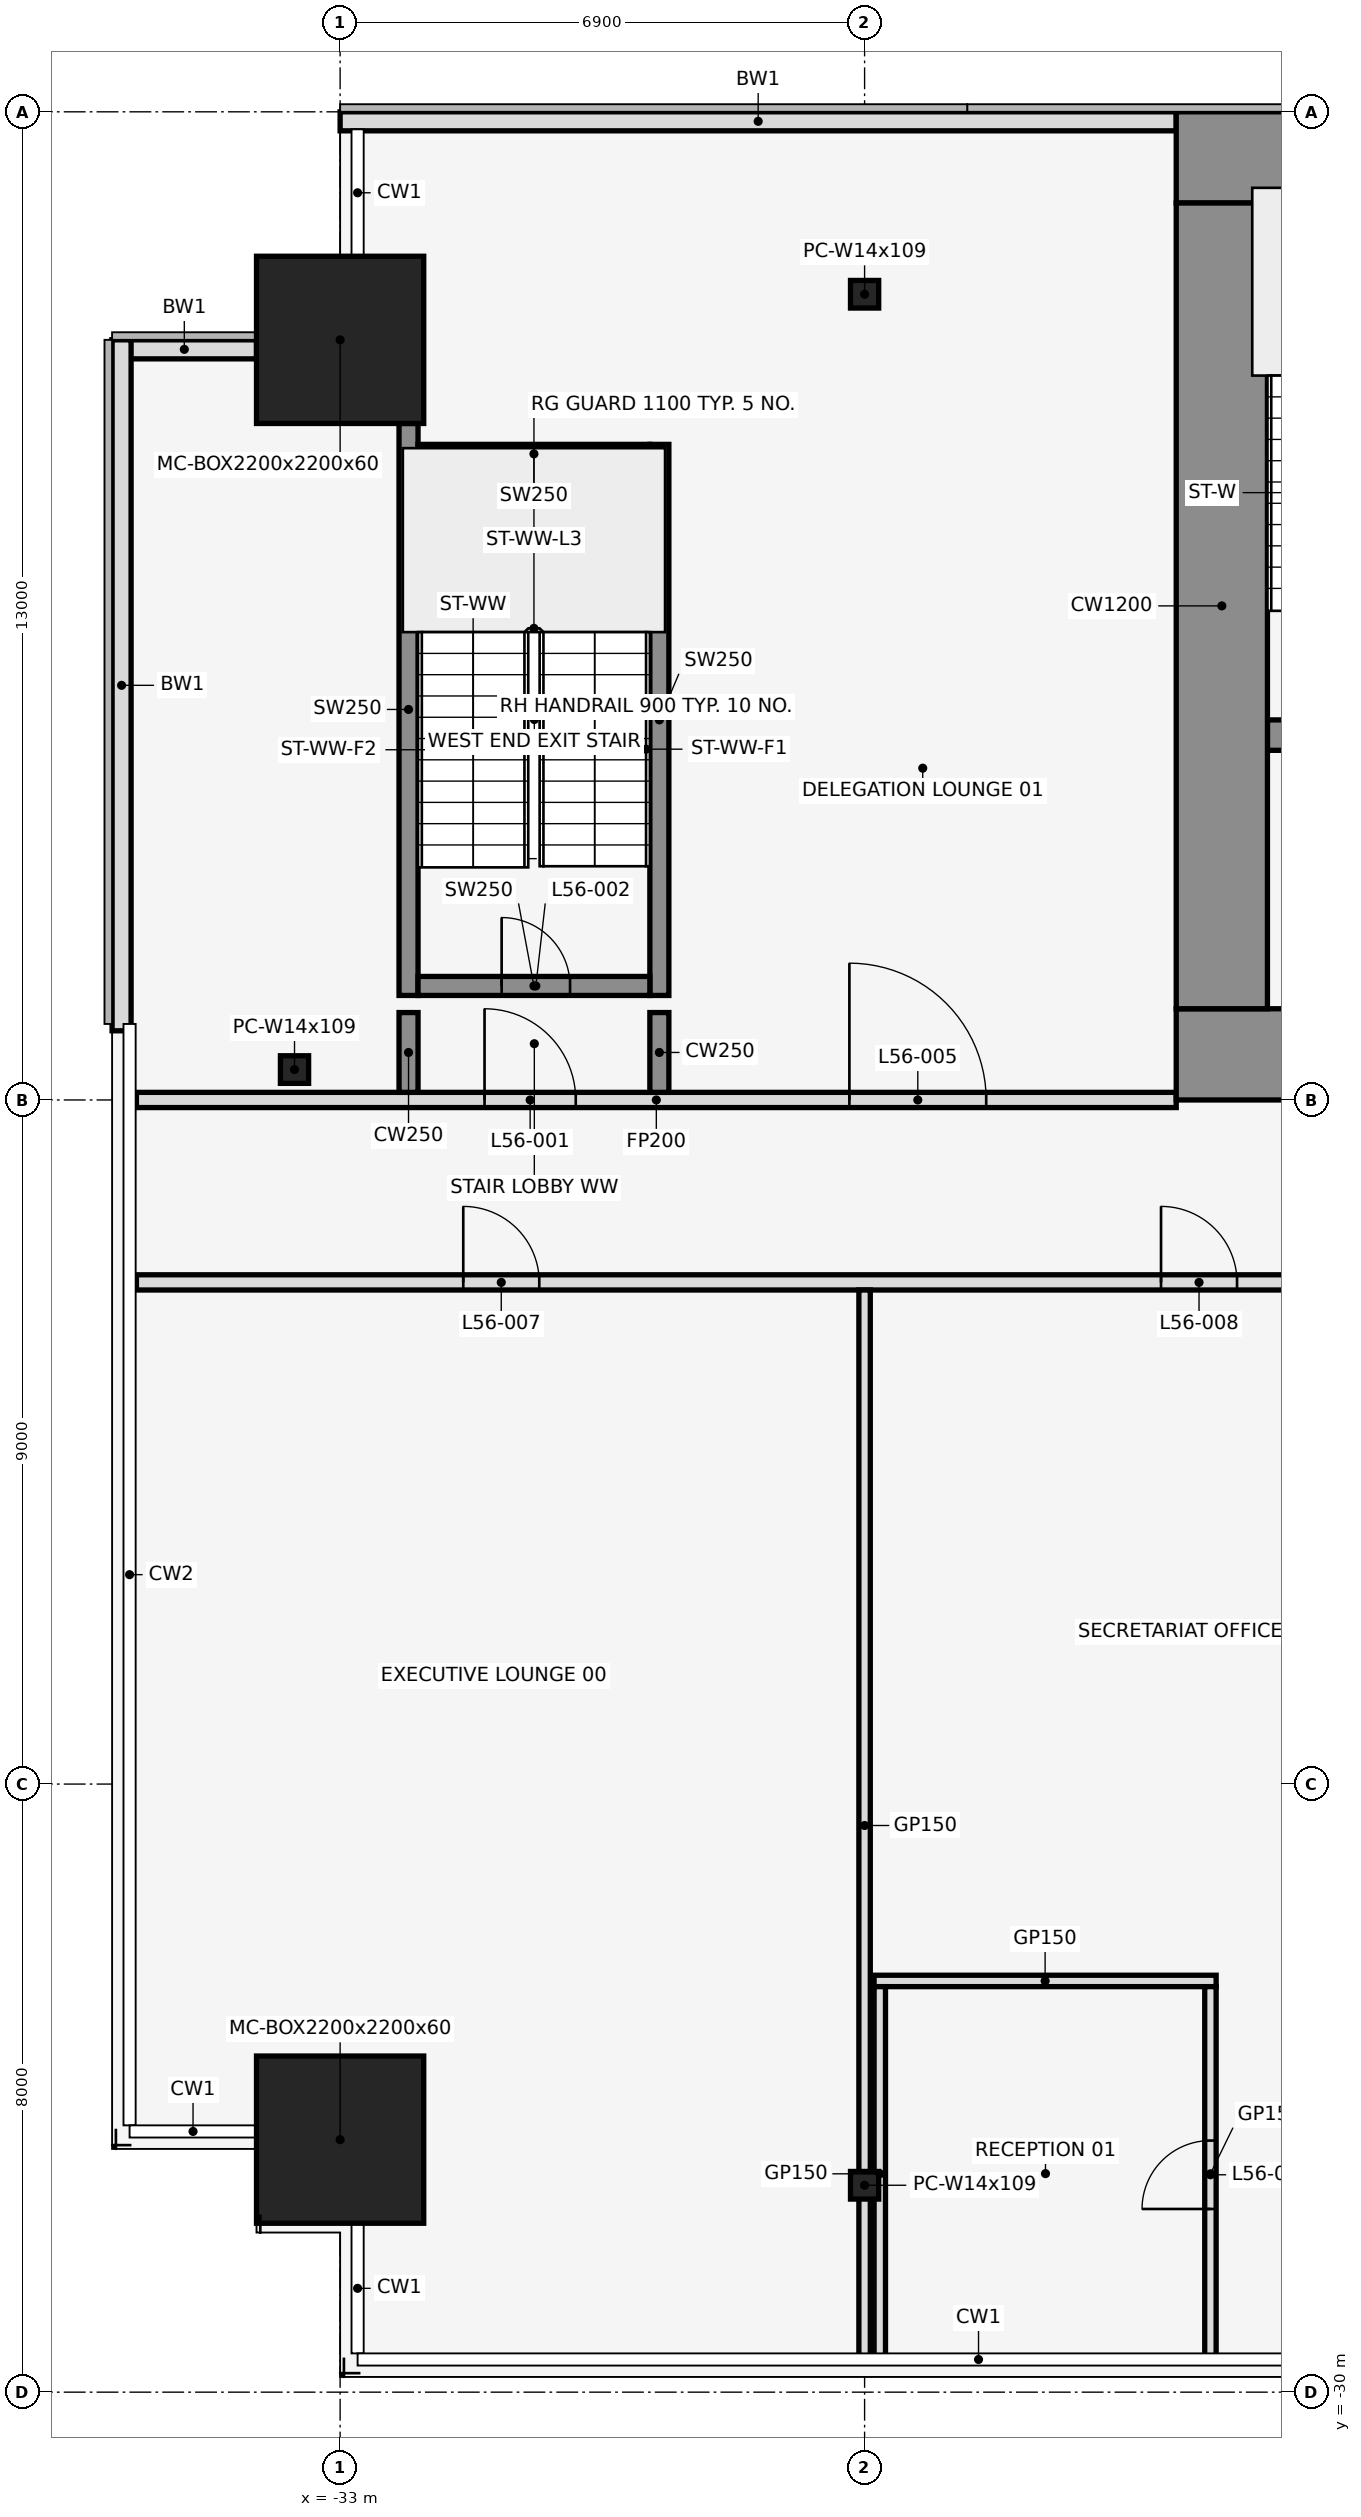
"""IFC4 building model, lengths in metres.
Left out: names, types, materials, properties, quantities, classifications, styles, units other than length and angle.
Written with IfcOpenShell. Run it as: python <this file> out.ifc"""

import sys

from ifc_helpers import new_model, si_unit, direction, frame, frame_2d, origin, origin_2d, place, context, subcontext, project, spatial, rectangle, hollow_rectangle, i_section, extrude, element, fill, save


model = new_model("IFC4")
c1 = context("Model", 3, precision=1e-05, world=origin(), true_north=direction((0.0, 1.0)))
c2 = subcontext(c1, "Body", "Model", "MODEL_VIEW")
j1 = project(units=[si_unit("LENGTHUNIT", "METRE"), si_unit("PLANEANGLEUNIT", "RADIAN")], contexts=[c1])
p1 = place(None, origin())
s1 = spatial("IfcSite", under=j1, at=p1, CompositionType="ELEMENT")
p2 = place(p1, origin())
s2 = spatial("IfcBuilding", under=s1, at=p2, CompositionType="ELEMENT")
p3 = place(p2, frame((0.0, 0.0, 249.8)))
s3 = spatial("IfcBuildingStorey", under=s2, at=p3, CompositionType="ELEMENT", Elevation=249.8)
for number, where, z_axis, x_axis in (
    (1, (-33.0, -26.678, 0.0), (0.0, 0.0, 1.0), (1.0, 0.0, 0.0)),
    (2, (-33.0, -3.0, 0.0), (0.0, 0.0, 1.0), (1.0, 0.0, 0.0)),
):
    element("IfcColumn", number, at=place(p3, frame(where, z_axis=z_axis, x_axis=x_axis)), inside=s3, PredefinedType="COLUMN", context=c2, shape_type="SweptSolid", body=[
        extrude(hollow_rectangle(XDim=2.2, YDim=2.2, WallThickness=0.06, at=origin_2d()), origin(), (0.0, 0.0, 1.0), 4.2),
    ])
for number, where, z_axis, x_axis in (
    (3, (-26.1, -27.278, 0.0), (0.0, 0.0, 1.0), (1.0, 0.0, 0.0)),
    (4, (-26.1, -2.4, 0.0), (0.0, 0.0, 1.0), (1.0, 0.0, 0.0)),
    (5, (-33.6, -12.6, 0.0), (0.0, 0.0, 1.0), (1.0, 0.0, 0.0)),
):
    element("IfcColumn", number, at=place(p3, frame(where, z_axis=z_axis, x_axis=x_axis)), inside=s3, PredefinedType="COLUMN", context=c2, shape_type="SweptSolid", body=[
        extrude(i_section(OverallWidth=0.371, OverallDepth=0.363, WebThickness=0.013, FlangeThickness=0.022, at=origin_2d()), origin(), (0.0, 0.0, 1.0), 4.2),
    ])
p4 = place(p3, frame((-22.0, -0.125, 0.0), z_axis=(0.0, 0.0, 1.0), x_axis=(-1.0, 0.0, 0.0)))
e6 = element("IfcWall", 6, at=p4, inside=s3, PredefinedType="STANDARD", context=c2, shape_type="SweptSolid", body=[
    extrude(rectangle(XDim=11.0, YDim=0.25, at=frame_2d((5.5, 0.0))), origin(), (0.0, 0.0, 1.0), 4.05),
])
p5 = place(p3, frame((-34.1, -3.125, 0.0), z_axis=(0.0, 0.0, 1.0), x_axis=(-1.0, 0.0, 0.0)))
e7 = element("IfcWall", 7, at=p5, inside=s3, PredefinedType="STANDARD", context=c2, shape_type="SweptSolid", body=[
    extrude(rectangle(XDim=1.9, YDim=0.25, at=frame_2d((0.95, 0.0))), origin(), (0.0, 0.0, 1.0), 4.05),
])
p6 = place(p3, frame((-35.875, -3.0, 0.0), z_axis=(0.0, 0.0, 1.0), x_axis=(0.0, -1.0, 0.0)))
e8 = element("IfcWall", 8, at=p6, inside=s3, PredefinedType="STANDARD", context=c2, shape_type="SweptSolid", body=[
    extrude(rectangle(XDim=9.09, YDim=0.25, at=frame_2d((4.545, 0.0))), origin(), (0.0, 0.0, 1.0), 4.05),
])
p7 = place(p3, frame((-32.1, -11.625, 0.0), z_axis=(0.0, 0.0, 1.0), x_axis=(0.0, 1.0, 0.0)))
e9 = element("IfcWall", 9, at=p7, inside=s3, PredefinedType="SHEAR", context=c2, shape_type="SweptSolid", body=[
    extrude(rectangle(XDim=7.525, YDim=0.25, at=frame_2d((3.762, 0.0))), origin(), (0.0, 0.0, 1.0), 4.2),
])
p8 = place(p3, frame((-28.8, -11.625, 0.0), z_axis=(0.0, 0.0, 1.0), x_axis=(0.0, 1.0, 0.0)))
e10 = element("IfcWall", 10, at=p8, inside=s3, PredefinedType="SHEAR", context=c2, shape_type="SweptSolid", body=[
    extrude(rectangle(XDim=7.25, YDim=0.25, at=frame_2d((3.625, 0.0))), origin(), (0.0, 0.0, 1.0), 4.2),
])
p9 = place(p3, frame((-31.975, -11.5, 0.0), z_axis=(0.0, 0.0, 1.0), x_axis=(1.0, 0.0, 0.0)))
e11 = element("IfcWall", 11, at=p9, inside=s3, PredefinedType="SHEAR", context=c2, shape_type="SweptSolid", body=[
    extrude(rectangle(XDim=3.05, YDim=0.25, at=frame_2d((1.525, 0.0))), origin(), (0.0, 0.0, 1.0), 4.2),
])
p10 = place(p9, frame((1.1, 0.0, 0.0)))
e12 = element("IfcOpeningElement", 12, at=p10, cuts=e11, PredefinedType="OPENING", context=c2, shape_type="SweptSolid", body=[
    extrude(rectangle(XDim=0.9, YDim=2.1, at=frame_2d((0.45, 1.05))), frame((0.0, 0.137, 0.0), z_axis=(0.0, -1.0, 0.0), x_axis=(1.0, 0.0, 0.0)), (0.0, 0.0, 1.0), 0.274),
])
p11 = place(p3, frame((-31.975, -4.5, 0.0), z_axis=(0.0, 0.0, 1.0), x_axis=(1.0, 0.0, 0.0)))
e13 = element("IfcWall", 13, at=p11, inside=s3, PredefinedType="SHEAR", context=c2, shape_type="SweptSolid", body=[
    extrude(rectangle(XDim=3.05, YDim=0.25, at=frame_2d((1.525, 0.0))), origin(), (0.0, 0.0, 1.0), 4.2),
])
p12 = place(p3, frame((-25.975, -24.59, 0.0), z_axis=(0.0, 0.0, 1.0), x_axis=(1.0, 0.0, 0.0)))
e14 = element("IfcWall", 14, at=p12, inside=s3, PredefinedType="PARTITIONING", context=c2, shape_type="SweptSolid", body=[
    extrude(rectangle(XDim=4.5, YDim=0.15, at=frame_2d((2.25, 0.0))), origin(), (0.0, 0.0, 1.0), 3.039),
])
p13 = place(p3, frame((-35.68, -15.4, 0.0), z_axis=(0.0, 0.0, 1.0), x_axis=(1.0, 0.0, 0.0)))
e15 = element("IfcWall", 15, at=p13, inside=s3, PredefinedType="PARTITIONING", context=c2, shape_type="SweptSolid", body=[
    extrude(rectangle(XDim=34.28, YDim=0.2, at=frame_2d((17.14, 0.0))), origin(), (0.0, 0.0, 1.0), 3.039),
])
p14 = place(p13, frame((4.3, 0.0, 0.0)))
e16 = element("IfcOpeningElement", 16, at=p14, cuts=e15, PredefinedType="OPENING", context=c2, shape_type="SweptSolid", body=[
    extrude(rectangle(XDim=1.0, YDim=2.1, at=frame_2d((0.5, 1.05))), frame((0.0, 0.112, 0.0), z_axis=(0.0, -1.0, 0.0), x_axis=(1.0, 0.0, 0.0)), (0.0, 0.0, 1.0), 0.224),
])
p15 = place(p13, frame((13.48, 0.0, 0.0)))
e17 = element("IfcOpeningElement", 17, at=p15, cuts=e15, PredefinedType="OPENING", context=c2, shape_type="SweptSolid", body=[
    extrude(rectangle(XDim=1.0, YDim=2.1, at=frame_2d((0.5, 1.05))), frame((0.0, 0.112, 0.0), z_axis=(0.0, -1.0, 0.0), x_axis=(1.0, 0.0, 0.0)), (0.0, 0.0, 1.0), 0.224),
])
p16 = place(p13, frame((20.68, 0.0, 0.0)))
e18 = element("IfcOpeningElement", 18, at=p16, cuts=e15, PredefinedType="OPENING", context=c2, shape_type="SweptSolid", body=[
    extrude(rectangle(XDim=1.0, YDim=2.1, at=frame_2d((0.5, 1.05))), frame((0.0, 0.112, 0.0), z_axis=(0.0, -1.0, 0.0), x_axis=(1.0, 0.0, 0.0)), (0.0, 0.0, 1.0), 0.224),
])
p17 = place(p13, frame((26.48, 0.0, 0.0)))
e19 = element("IfcOpeningElement", 19, at=p17, cuts=e15, PredefinedType="OPENING", context=c2, shape_type="SweptSolid", body=[
    extrude(rectangle(XDim=1.0, YDim=2.1, at=frame_2d((0.5, 1.05))), frame((0.0, 0.112, 0.0), z_axis=(0.0, -1.0, 0.0), x_axis=(1.0, 0.0, 0.0)), (0.0, 0.0, 1.0), 0.224),
])
p18 = place(p3, frame((-35.68, -13.0, 0.0), z_axis=(0.0, 0.0, 1.0), x_axis=(1.0, 0.0, 0.0)))
e20 = element("IfcWall", 20, at=p18, inside=s3, PredefinedType="PARTITIONING", context=c2, shape_type="SweptSolid", body=[
    extrude(rectangle(XDim=13.68, YDim=0.2, at=frame_2d((6.84, 0.0))), origin(), (0.0, 0.0, 1.0), 3.039),
])
p19 = place(p18, frame((4.58, 0.0, 0.0)))
e21 = element("IfcOpeningElement", 21, at=p19, cuts=e20, PredefinedType="OPENING", context=c2, shape_type="SweptSolid", body=[
    extrude(rectangle(XDim=1.2, YDim=2.1, at=frame_2d((0.6, 1.05))), frame((0.0, 0.112, 0.0), z_axis=(0.0, -1.0, 0.0), x_axis=(1.0, 0.0, 0.0)), (0.0, 0.0, 1.0), 0.224),
])
p20 = place(p18, frame((9.38, 0.0, 0.0)))
e22 = element("IfcOpeningElement", 22, at=p20, cuts=e20, PredefinedType="OPENING", context=c2, shape_type="SweptSolid", body=[
    extrude(rectangle(XDim=1.8, YDim=2.1, at=frame_2d((0.9, 1.05))), frame((0.0, 0.112, 0.0), z_axis=(0.0, -1.0, 0.0), x_axis=(1.0, 0.0, 0.0)), (0.0, 0.0, 1.0), 0.224),
])
for number, where, z_axis, x_axis in (
    (23, (-32.1, -12.9, 0.0), (0.0, 0.0, 1.0), (0.0, 1.0, 0.0)),
    (24, (-28.8, -12.9, 0.0), (0.0, 0.0, 1.0), (0.0, 1.0, 0.0)),
):
    element("IfcWall", number, at=place(p3, frame(where, z_axis=z_axis, x_axis=x_axis)), inside=s3, PredefinedType="SHEAR", context=c2, shape_type="SweptSolid", body=[
        extrude(rectangle(XDim=1.05, YDim=0.25, at=frame_2d((0.525, 0.0))), origin(), (0.0, 0.0, 1.0), 4.2),
    ])
p21 = place(p3, frame((-26.1, -29.59, 0.0), z_axis=(0.0, 0.0, 1.0), x_axis=(0.0, 1.0, 0.0)))
e25 = element("IfcWall", 25, at=p21, inside=s3, PredefinedType="PARTITIONING", context=c2, shape_type="SweptSolid", body=[
    extrude(rectangle(XDim=14.09, YDim=0.15, at=frame_2d((7.045, 0.0))), origin(), (0.0, 0.0, 1.0), 3.039),
])
p22 = place(p3, frame((-25.9, -29.59, 0.0), z_axis=(0.0, 0.0, 1.0), x_axis=(0.0, 1.0, 0.0)))
e26 = element("IfcWall", 26, at=p22, inside=s3, PredefinedType="PARTITIONING", context=c2, shape_type="SweptSolid", body=[
    extrude(rectangle(XDim=4.925, YDim=0.15, at=frame_2d((2.462, 0.0))), origin(), (0.0, 0.0, 1.0), 3.039),
])
p23 = place(p3, frame((-21.55, -29.59, 0.0), z_axis=(0.0, 0.0, 1.0), x_axis=(0.0, 1.0, 0.0)))
e27 = element("IfcWall", 27, at=p23, inside=s3, PredefinedType="PARTITIONING", context=c2, shape_type="SweptSolid", body=[
    extrude(rectangle(XDim=4.925, YDim=0.15, at=frame_2d((2.462, 0.0))), origin(), (0.0, 0.0, 1.0), 3.039),
])
p24 = place(p23, frame((2.0, 0.0, 0.0)))
e28 = element("IfcOpeningElement", 28, at=p24, cuts=e27, PredefinedType="OPENING", context=c2, shape_type="SweptSolid", body=[
    extrude(rectangle(XDim=0.9, YDim=2.1, at=frame_2d((0.45, 1.05))), frame((0.0, 0.087, 0.0), z_axis=(0.0, -1.0, 0.0), x_axis=(1.0, 0.0, 0.0)), (0.0, 0.0, 1.0), 0.174),
])
p25 = place(p3, frame((-20.8, -8.2, 0.0), z_axis=(0.0, 0.0, 1.0), x_axis=(1.0, 0.0, 0.0)))
e29 = element("IfcWall", 29, at=p25, inside=s3, PredefinedType="SHEAR", context=c2, shape_type="SweptSolid", body=[
    extrude(rectangle(XDim=3.0, YDim=0.4, at=frame_2d((1.5, 0.0))), origin(), (0.0, 0.0, 1.0), 4.2),
])
p26 = place(p25, frame((0.85, 0.0, 0.0)))
e30 = element("IfcOpeningElement", 30, at=p26, cuts=e29, PredefinedType="OPENING", context=c2, shape_type="SweptSolid", body=[
    extrude(rectangle(XDim=1.2, YDim=2.1, at=frame_2d((0.6, 1.05))), frame((0.0, 0.212, 0.0), z_axis=(0.0, -1.0, 0.0), x_axis=(1.0, 0.0, 0.0)), (0.0, 0.0, 1.0), 0.424),
])
p27 = place(p3, frame((-22.0, -0.6, 0.0), z_axis=(0.0, 0.0, 1.0), x_axis=(1.0, 0.0, 0.0)))
e31 = element("IfcWall", 31, at=p27, inside=s3, PredefinedType="SHEAR", context=c2, shape_type="SweptSolid", body=[
    extrude(rectangle(XDim=44.0, YDim=1.2, at=frame_2d((22.0, 0.0))), origin(), (0.0, 0.0, 1.0), 4.2),
])
p28 = place(p27, frame((18.55, 0.0, 0.0)))
e32 = element("IfcOpeningElement", 32, at=p28, cuts=e31, PredefinedType="OPENING", context=c2, shape_type="SweptSolid", body=[
    extrude(rectangle(XDim=0.9, YDim=2.1, at=frame_2d((0.45, 1.05))), frame((0.0, 0.612, 0.0), z_axis=(0.0, -1.0, 0.0), x_axis=(1.0, 0.0, 0.0)), (0.0, 0.0, 1.0), 1.224),
])
p29 = place(p27, frame((24.55, 0.0, 0.0)))
e33 = element("IfcOpeningElement", 33, at=p29, cuts=e31, PredefinedType="OPENING", context=c2, shape_type="SweptSolid", body=[
    extrude(rectangle(XDim=0.9, YDim=2.1, at=frame_2d((0.45, 1.05))), frame((0.0, 0.612, 0.0), z_axis=(0.0, -1.0, 0.0), x_axis=(1.0, 0.0, 0.0)), (0.0, 0.0, 1.0), 1.224),
])
p30 = place(p3, frame((-22.0, -12.4, 0.0), z_axis=(0.0, 0.0, 1.0), x_axis=(1.0, 0.0, 0.0)))
e34 = element("IfcWall", 34, at=p30, inside=s3, PredefinedType="SHEAR", context=c2, shape_type="SweptSolid", body=[
    extrude(rectangle(XDim=44.0, YDim=1.2, at=frame_2d((22.0, 0.0))), origin(), (0.0, 0.0, 1.0), 4.2),
])
p31 = place(p30, frame((2.2, 0.0, 0.0)))
e35 = element("IfcOpeningElement", 35, at=p31, cuts=e34, PredefinedType="OPENING", context=c2, shape_type="SweptSolid", body=[
    extrude(rectangle(XDim=1.2, YDim=2.1, at=frame_2d((0.6, 1.05))), frame((0.0, 0.612, 0.0), z_axis=(0.0, -1.0, 0.0), x_axis=(1.0, 0.0, 0.0)), (0.0, 0.0, 1.0), 1.224),
])
p32 = place(p30, frame((21.4, 0.0, 0.0)))
e36 = element("IfcOpeningElement", 36, at=p32, cuts=e34, PredefinedType="OPENING", context=c2, shape_type="SweptSolid", body=[
    extrude(rectangle(XDim=1.2, YDim=2.1, at=frame_2d((0.6, 1.05))), frame((0.0, 0.612, 0.0), z_axis=(0.0, -1.0, 0.0), x_axis=(1.0, 0.0, 0.0)), (0.0, 0.0, 1.0), 1.224),
])
p33 = place(p30, frame((40.6, 0.0, 0.0)))
e37 = element("IfcOpeningElement", 37, at=p33, cuts=e34, PredefinedType="OPENING", context=c2, shape_type="SweptSolid", body=[
    extrude(rectangle(XDim=1.2, YDim=2.1, at=frame_2d((0.6, 1.05))), frame((0.0, 0.612, 0.0), z_axis=(0.0, -1.0, 0.0), x_axis=(1.0, 0.0, 0.0)), (0.0, 0.0, 1.0), 1.224),
])
p34 = place(p30, frame((16.0, 0.0, 0.0)))
e38 = element("IfcOpeningElement", 38, at=p34, cuts=e34, PredefinedType="OPENING", context=c2, shape_type="SweptSolid", body=[
    extrude(rectangle(XDim=1.8, YDim=2.1, at=frame_2d((0.9, 1.05))), frame((0.0, 0.612, 0.0), z_axis=(0.0, -1.0, 0.0), x_axis=(1.0, 0.0, 0.0)), (0.0, 0.0, 1.0), 1.224),
])
p35 = place(p30, frame((6.3, 0.0, 0.0)))
e39 = element("IfcOpeningElement", 39, at=p35, cuts=e34, PredefinedType="OPENING", context=c2, shape_type="SweptSolid", body=[
    extrude(rectangle(XDim=1.2, YDim=2.1, at=frame_2d((0.6, 1.05))), frame((0.0, 0.612, 0.0), z_axis=(0.0, -1.0, 0.0), x_axis=(1.0, 0.0, 0.0)), (0.0, 0.0, 1.0), 1.224),
])
p36 = place(p30, frame((26.2, 0.0, 0.0)))
e40 = element("IfcOpeningElement", 40, at=p36, cuts=e34, PredefinedType="OPENING", context=c2, shape_type="SweptSolid", body=[
    extrude(rectangle(XDim=1.8, YDim=2.1, at=frame_2d((0.9, 1.05))), frame((0.0, 0.612, 0.0), z_axis=(0.0, -1.0, 0.0), x_axis=(1.0, 0.0, 0.0)), (0.0, 0.0, 1.0), 1.224),
])
p37 = place(p30, frame((36.5, 0.0, 0.0)))
e41 = element("IfcOpeningElement", 41, at=p37, cuts=e34, PredefinedType="OPENING", context=c2, shape_type="SweptSolid", body=[
    extrude(rectangle(XDim=1.2, YDim=2.1, at=frame_2d((0.6, 1.05))), frame((0.0, 0.612, 0.0), z_axis=(0.0, -1.0, 0.0), x_axis=(1.0, 0.0, 0.0)), (0.0, 0.0, 1.0), 1.224),
])
p38 = place(p3, frame((-21.4, -11.8, 0.0), z_axis=(0.0, 0.0, 1.0), x_axis=(0.0, 1.0, 0.0)))
e42 = element("IfcWall", 42, at=p38, inside=s3, PredefinedType="SHEAR", context=c2, shape_type="SweptSolid", body=[
    extrude(rectangle(XDim=10.6, YDim=1.2, at=frame_2d((5.3, 0.0))), origin(), (0.0, 0.0, 1.0), 4.2),
])
p39 = place(p19, origin())
e43 = element("IfcDoor", 43, at=p39, inside=s3, OperationType="SINGLE_SWING_LEFT", PredefinedType="DOOR", context=c2, shape_type="SweptSolid", body=[
    extrude(rectangle(XDim=1.2, YDim=2.1, at=frame_2d((0.6, 1.05))), frame((0.0, 0.025, 0.0), z_axis=(0.0, -1.0, 0.0), x_axis=(1.0, 0.0, 0.0)), (0.0, 0.0, 1.0), 0.05),
])
fill(e21, e43)
p40 = place(p10, origin())
e44 = element("IfcDoor", 44, at=p40, inside=s3, OperationType="SINGLE_SWING_LEFT", PredefinedType="DOOR", context=c2, shape_type="SweptSolid", body=[
    extrude(rectangle(XDim=0.9, YDim=2.1, at=frame_2d((0.45, 1.05))), frame((0.0, 0.025, 0.0), z_axis=(0.0, -1.0, 0.0), x_axis=(1.0, 0.0, 0.0)), (0.0, 0.0, 1.0), 0.05),
])
fill(e12, e44)
p41 = place(p20, origin())
e45 = element("IfcDoor", 45, at=p41, inside=s3, OperationType="SINGLE_SWING_LEFT", PredefinedType="DOOR", context=c2, shape_type="SweptSolid", body=[
    extrude(rectangle(XDim=1.8, YDim=2.1, at=frame_2d((0.9, 1.05))), frame((0.0, 0.025, 0.0), z_axis=(0.0, -1.0, 0.0), x_axis=(1.0, 0.0, 0.0)), (0.0, 0.0, 1.0), 0.05),
])
fill(e22, e45)
p42 = place(p14, frame((1.0, 0.0, 0.0), z_axis=(0.0, 0.0, 1.0), x_axis=(-1.0, 0.0, 0.0)))
e46 = element("IfcDoor", 46, at=p42, inside=s3, OperationType="SINGLE_SWING_LEFT", PredefinedType="DOOR", context=c2, shape_type="SweptSolid", body=[
    extrude(rectangle(XDim=1.0, YDim=2.1, at=frame_2d((0.5, 1.05))), frame((0.0, 0.025, 0.0), z_axis=(0.0, -1.0, 0.0), x_axis=(1.0, 0.0, 0.0)), (0.0, 0.0, 1.0), 0.05),
])
fill(e16, e46)
p43 = place(p15, frame((1.0, 0.0, 0.0), z_axis=(0.0, 0.0, 1.0), x_axis=(-1.0, 0.0, 0.0)))
e47 = element("IfcDoor", 47, at=p43, inside=s3, OperationType="SINGLE_SWING_RIGHT", PredefinedType="DOOR", context=c2, shape_type="SweptSolid", body=[
    extrude(rectangle(XDim=1.0, YDim=2.1, at=frame_2d((0.5, 1.05))), frame((0.0, 0.025, 0.0), z_axis=(0.0, -1.0, 0.0), x_axis=(1.0, 0.0, 0.0)), (0.0, 0.0, 1.0), 0.05),
])
fill(e17, e47)
p44 = place(p24, origin())
e48 = element("IfcDoor", 48, at=p44, inside=s3, OperationType="SINGLE_SWING_LEFT", PredefinedType="DOOR", context=c2, shape_type="SweptSolid", body=[
    extrude(rectangle(XDim=0.9, YDim=2.1, at=frame_2d((0.45, 1.05))), frame((0.0, 0.025, 0.0), z_axis=(0.0, -1.0, 0.0), x_axis=(1.0, 0.0, 0.0)), (0.0, 0.0, 1.0), 0.05),
])
fill(e28, e48)
save(model, sys.argv[1])
